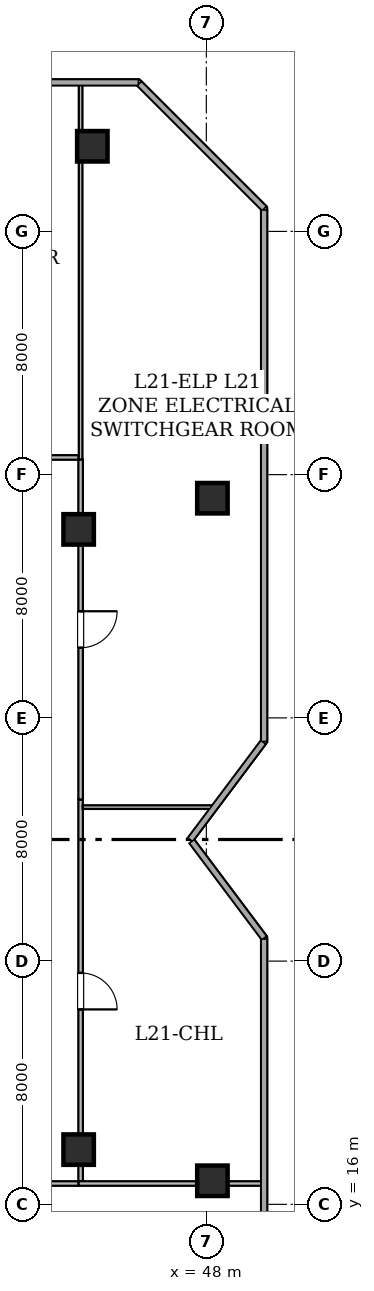
"""IFC4 building model, lengths in metres.
Left out: names, types, materials, properties, quantities, classifications, styles, units other than length and angle.
Written with IfcOpenShell. Run it as: python <this file> out.ifc"""

import sys

from ifc_helpers import new_model, si_unit, direction, frame, frame_2d, origin, origin_2d, place, context, subcontext, project, spatial, rectangle, hollow_rectangle, extrude, element, fill, save


model = new_model("IFC4")
c1 = context("Model", 3, precision=1e-05, world=origin(), true_north=direction((0.0, 1.0)))
c2 = subcontext(c1, "Body", "Model", "MODEL_VIEW")
j1 = project(units=[si_unit("LENGTHUNIT", "METRE"), si_unit("PLANEANGLEUNIT", "RADIAN")], contexts=[c1])
p1 = place(None, origin())
s1 = spatial("IfcSite", under=j1, at=p1, CompositionType="ELEMENT")
p2 = place(p1, origin())
s2 = spatial("IfcBuilding", under=s1, at=p2, CompositionType="ELEMENT")
p3 = place(p2, frame((0.0, 0.0, 84.4)))
s3 = spatial("IfcBuildingStorey", under=s2, at=p3, CompositionType="ELEMENT", Elevation=84.4)
for number, where, z_axis, x_axis in (
    (1, (44.25, 50.8, 0.0), (0.0, 0.0, 1.0), (1.0, 0.0, 0.0)),
    (2, (48.2, 16.775, 0.0), (0.0, 0.0, 1.0), (1.0, 0.0, 0.0)),
    (3, (48.2, 39.225, 0.0), (0.0, 0.0, 1.0), (1.0, 0.0, 0.0)),
    (4, (43.8, 17.8, 0.0), (0.0, 0.0, 1.0), (1.0, 0.0, 0.0)),
    (5, (43.8, 38.2, 0.0), (0.0, 0.0, 1.0), (1.0, 0.0, 0.0)),
):
    element("IfcColumn", number, at=place(p3, frame(where, z_axis=z_axis, x_axis=x_axis)), inside=s3, PredefinedType="COLUMN", context=c2, shape_type="SweptSolid", body=[
        extrude(hollow_rectangle(XDim=1.0, YDim=1.0, WallThickness=0.05, at=origin_2d()), origin(), (0.0, 0.0, 1.0), 5.375),
    ])
p4 = place(p3, frame((8.302, 52.9, 0.0), z_axis=(0.0, 0.0, 1.0), x_axis=(1.0, 0.0, 0.0)))
e6 = element("IfcWall", 6, at=p4, inside=s3, PredefinedType="STANDARD", context=c2, shape_type="SweptSolid", body=[
    extrude(rectangle(XDim=37.457, YDim=0.2, at=frame_2d((18.729, 0.0))), origin(), (0.0, 0.0, 1.0), 1.15),
])
p5 = place(p3, frame((45.802, 52.857, 0.0), z_axis=(0.0, 0.0, 1.0), x_axis=(0.707106781187, -0.707106781187, 0.0)))
e7 = element("IfcWall", 7, at=p5, inside=s3, PredefinedType="STANDARD", context=c2, shape_type="SweptSolid", body=[
    extrude(rectangle(XDim=5.795, YDim=0.2, at=frame_2d((2.898, 0.0))), origin(), (0.0, 0.0, 1.0), 1.15),
])
p6 = place(p3, frame((49.9, 48.696, 0.0), z_axis=(0.0, 0.0, 1.0), x_axis=(0.0, -1.0, 0.0)))
e8 = element("IfcWall", 8, at=p6, inside=s3, PredefinedType="STANDARD", context=c2, shape_type="SweptSolid", body=[
    extrude(rectangle(XDim=17.463, YDim=0.2, at=frame_2d((8.731, 0.0))), origin(), (0.0, 0.0, 1.0), 1.15),
])
p7 = place(p3, frame((49.869, 31.191, 0.0), z_axis=(0.0, 0.0, 1.0), x_axis=(-0.600097920714, -0.7999265501, 0.0)))
e9 = element("IfcWall", 9, at=p7, inside=s3, PredefinedType="STANDARD", context=c2, shape_type="SweptSolid", body=[
    extrude(rectangle(XDim=3.989, YDim=0.2, at=frame_2d((1.995, 0.0))), origin(), (0.0, 0.0, 1.0), 1.15),
])
p8 = place(p3, frame((47.527, 27.931, 0.0), z_axis=(0.0, 0.0, 1.0), x_axis=(0.599990122557, -0.800007407987, 0.0)))
e10 = element("IfcWall", 10, at=p8, inside=s3, PredefinedType="STANDARD", context=c2, shape_type="SweptSolid", body=[
    extrude(rectangle(XDim=3.955, YDim=0.2, at=frame_2d((1.978, 0.0))), origin(), (0.0, 0.0, 1.0), 1.15),
])
p9 = place(p3, frame((49.9, 24.717, 0.0), z_axis=(0.0, 0.0, 1.0), x_axis=(0.0, -1.0, 0.0)))
e11 = element("IfcWall", 11, at=p9, inside=s3, PredefinedType="STANDARD", context=c2, shape_type="SweptSolid", body=[
    extrude(rectangle(XDim=17.476, YDim=0.2, at=frame_2d((8.738, 0.0))), origin(), (0.0, 0.0, 1.0), 1.15),
])
p10 = place(p3, frame((43.8, 16.685, 0.0), z_axis=(0.0, 0.0, 1.0), x_axis=(-1.0, 0.0, 0.0)))
e12 = element("IfcWall", 12, at=p10, inside=s3, PredefinedType="STANDARD", context=c2, shape_type="SweptSolid", body=[
    extrude(rectangle(XDim=18.7, YDim=0.15, at=frame_2d((9.35, 0.0))), origin(), (0.0, 0.0, 1.0), 3.42),
])
p11 = place(p10, frame((8.75, 0.0, 0.0)))
e13 = element("IfcOpeningElement", 13, at=p11, cuts=e12, PredefinedType="OPENING", context=c2, shape_type="SweptSolid", body=[
    extrude(rectangle(XDim=1.2, YDim=2.15, at=frame_2d((0.6, 1.075))), frame((0.0, 0.085, 0.0), z_axis=(0.0, -1.0, 0.0), x_axis=(1.0, 0.0, 0.0)), (0.0, 0.0, 1.0), 0.17),
])
p12 = place(p3, frame((43.865, 29.314, 0.0), z_axis=(0.0, 0.0, 1.0), x_axis=(0.0, -1.0, 0.0)))
e14 = element("IfcWall", 14, at=p12, inside=s3, PredefinedType="STANDARD", context=c2, shape_type="SweptSolid", body=[
    extrude(rectangle(XDim=12.564, YDim=0.15, at=frame_2d((6.282, 0.0))), origin(), (0.0, 0.0, 1.0), 3.42),
])
p13 = place(p12, frame((5.703, 0.0, 0.0)))
e15 = element("IfcOpeningElement", 15, at=p13, cuts=e14, PredefinedType="OPENING", context=c2, shape_type="SweptSolid", body=[
    extrude(rectangle(XDim=1.2, YDim=2.15, at=frame_2d((0.6, 1.075))), frame((0.0, 0.085, 0.0), z_axis=(0.0, -1.0, 0.0), x_axis=(1.0, 0.0, 0.0)), (0.0, 0.0, 1.0), 0.17),
])
p14 = place(p3, frame((43.865, 40.5, 0.0), z_axis=(0.0, 0.0, 1.0), x_axis=(0.0, -1.0, 0.0)))
e16 = element("IfcWall", 16, at=p14, inside=s3, PredefinedType="STANDARD", context=c2, shape_type="SweptSolid", body=[
    extrude(rectangle(XDim=11.186, YDim=0.15, at=frame_2d((5.593, 0.0))), origin(), (0.0, 0.0, 1.0), 3.42),
])
p15 = place(p14, frame((4.993, 0.0, 0.0)))
e17 = element("IfcOpeningElement", 17, at=p15, cuts=e16, PredefinedType="OPENING", context=c2, shape_type="SweptSolid", body=[
    extrude(rectangle(XDim=1.2, YDim=2.15, at=frame_2d((0.6, 1.075))), frame((0.0, 0.085, 0.0), z_axis=(0.0, -1.0, 0.0), x_axis=(1.0, 0.0, 0.0)), (0.0, 0.0, 1.0), 0.17),
])
p16 = place(p3, frame((25.1, 40.565, 0.0), z_axis=(0.0, 0.0, 1.0), x_axis=(1.0, 0.0, 0.0)))
e18 = element("IfcWall", 18, at=p16, inside=s3, PredefinedType="STANDARD", context=c2, shape_type="SweptSolid", body=[
    extrude(rectangle(XDim=18.7, YDim=0.15, at=frame_2d((9.35, 0.0))), origin(), (0.0, 0.0, 1.0), 3.42),
])
p17 = place(p16, frame((8.75, 0.0, 0.0)))
e19 = element("IfcOpeningElement", 19, at=p17, cuts=e18, PredefinedType="OPENING", context=c2, shape_type="SweptSolid", body=[
    extrude(rectangle(XDim=1.2, YDim=2.15, at=frame_2d((0.6, 1.075))), frame((0.0, 0.085, 0.0), z_axis=(0.0, -1.0, 0.0), x_axis=(1.0, 0.0, 0.0)), (0.0, 0.0, 1.0), 0.17),
])
p18 = place(p3, frame((43.8, 16.685, 0.0), z_axis=(0.0, 0.0, 1.0), x_axis=(1.0, 0.0, 0.0)))
e20 = element("IfcWall", 20, at=p18, inside=s3, PredefinedType="STANDARD", context=c2, shape_type="SweptSolid", body=[
    extrude(rectangle(XDim=6.008, YDim=0.15, at=frame_2d((3.004, 0.0))), origin(), (0.0, 0.0, 1.0), 3.42),
])
p19 = place(p3, frame((43.932, 29.065, 0.0), z_axis=(0.0, 0.0, 1.0), x_axis=(1.0, 0.0, 0.0)))
e21 = element("IfcWall", 21, at=p19, inside=s3, PredefinedType="PARTITIONING", context=c2, shape_type="SweptSolid", body=[
    extrude(rectangle(XDim=4.238, YDim=0.12, at=frame_2d((2.119, 0.0))), origin(), (0.0, 0.0, 1.0), 3.42),
])
p20 = place(p3, frame((43.865, 40.5, 0.0), z_axis=(0.0, 0.0, 1.0), x_axis=(0.0, 1.0, 0.0)))
e22 = element("IfcWall", 22, at=p20, inside=s3, PredefinedType="PARTITIONING", context=c2, shape_type="SweptSolid", body=[
    extrude(rectangle(XDim=12.308, YDim=0.12, at=frame_2d((6.154, 0.0))), origin(), (0.0, 0.0, 1.0), 3.42),
])
p21 = place(p13, origin())
e23 = element("IfcDoor", 23, at=p21, inside=s3, OperationType="SINGLE_SWING_RIGHT", PredefinedType="DOOR", context=c2, shape_type="SweptSolid", body=[
    extrude(rectangle(XDim=1.2, YDim=2.15, at=frame_2d((0.6, 1.075))), frame((0.0, 0.025, 0.0), z_axis=(0.0, -1.0, 0.0), x_axis=(1.0, 0.0, 0.0)), (0.0, 0.0, 1.0), 0.05),
])
fill(e15, e23)
p22 = place(p15, origin())
e24 = element("IfcDoor", 24, at=p22, inside=s3, OperationType="SINGLE_SWING_LEFT", PredefinedType="DOOR", context=c2, shape_type="SweptSolid", body=[
    extrude(rectangle(XDim=1.2, YDim=2.15, at=frame_2d((0.6, 1.075))), frame((0.0, 0.025, 0.0), z_axis=(0.0, -1.0, 0.0), x_axis=(1.0, 0.0, 0.0)), (0.0, 0.0, 1.0), 0.05),
])
fill(e17, e24)
save(model, sys.argv[1])
